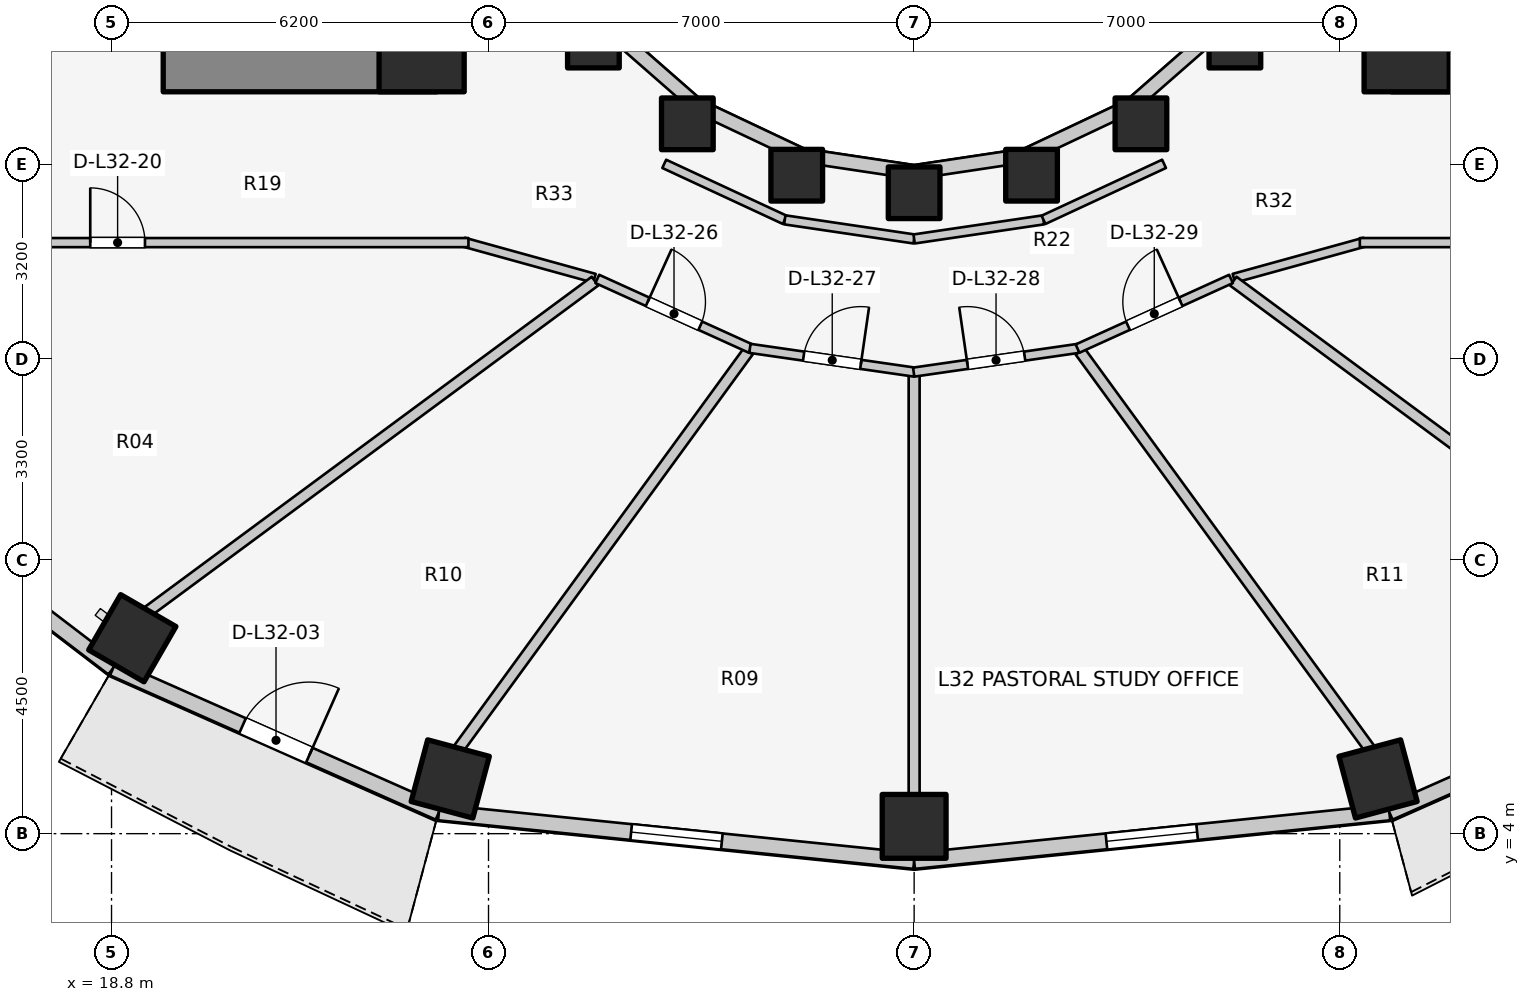
"""IFC4 building model, lengths in metres.
Left out: names, types, materials, properties, quantities, classifications, styles, units other than length and angle.
Written with IfcOpenShell. Run it as: python <this file> out.ifc"""

import sys

from ifc_helpers import new_model, si_unit, direction, frame, frame_2d, origin, origin_2d, place, context, subcontext, project, spatial, rectangle, extrude, element, fill, save


model = new_model("IFC4")
c1 = context("Model", 3, precision=1e-05, world=origin(), true_north=direction((0.0, 1.0)))
c2 = subcontext(c1, "Body", "Model", "MODEL_VIEW")
j1 = project(units=[si_unit("LENGTHUNIT", "METRE"), si_unit("PLANEANGLEUNIT", "RADIAN")], contexts=[c1])
p1 = place(None, origin())
s1 = spatial("IfcSite", under=j1, at=p1, CompositionType="ELEMENT")
p2 = place(p1, origin())
s2 = spatial("IfcBuilding", under=s1, at=p2, CompositionType="ELEMENT")
p3 = place(p2, frame((0.0, 0.0, 107.3)))
s3 = spatial("IfcBuildingStorey", under=s2, at=p3, CompositionType="ELEMENT", Elevation=107.3)
for number, where, z_axis, x_axis in (
    (1, (19.65, 16.55, 0.0), (0.0, 0.0, 1.0), (1.0, 0.0, 0.0)),
    (2, (39.85, 16.55, 0.0), (0.0, 0.0, 1.0), (1.0, 0.0, 0.0)),
):
    element("IfcWall", number, at=place(p3, frame(where, z_axis=z_axis, x_axis=x_axis)), inside=s3, PredefinedType="SHEAR", context=c2, shape_type="SweptSolid", body=[
        extrude(rectangle(XDim=4.5, YDim=0.7, at=frame_2d((2.25, 0.0))), origin(), (0.0, 0.0, 1.0), 3.1),
    ])
for number, where, z_axis, x_axis in (
    (3, (23.9, 16.9, 0.0), (0.0, 0.0, 1.0), (1.0, 0.0, 0.0)),
    (4, (40.1, 16.9, 0.0), (0.0, 0.0, 1.0), (1.0, 0.0, 0.0)),
):
    element("IfcColumn", number, at=place(p3, frame(where, z_axis=z_axis, x_axis=x_axis)), inside=s3, PredefinedType="COLUMN", context=c2, shape_type="SweptSolid", body=[
        extrude(rectangle(XDim=1.4, YDim=1.4, at=origin_2d()), origin(), (0.0, 0.0, 1.0), 3.1),
    ])
for number, where, z_axis, x_axis in (
    (5, (26.725, 17.018, 0.0), (0.0, 0.0, 1.0), (1.0, 0.0, 0.0)),
    (6, (28.27, 15.673, 0.0), (0.0, 0.0, 1.0), (1.0, 0.0, 0.0)),
):
    element("IfcColumn", number, at=place(p3, frame(where, z_axis=z_axis, x_axis=x_axis)), inside=s3, PredefinedType="COLUMN", context=c2, shape_type="SweptSolid", body=[
        extrude(rectangle(XDim=0.85, YDim=0.85, at=origin_2d()), origin(), (0.0, 0.0, 1.0), 3.1),
    ])
p4 = place(p3, frame((19.142, 7.214, 0.0), z_axis=(0.0, 0.0, 1.0), x_axis=(-0.5, -0.866025403784, 0.0)))
e7 = element("IfcColumn", 7, at=p4, inside=s3, PredefinedType="COLUMN", context=c2, shape_type="SweptSolid", body=[
    extrude(rectangle(XDim=1.05, YDim=1.05, at=origin_2d()), origin(), (0.0, 0.0, 1.0), 3.1),
])
p5 = place(p3, frame((30.069, 14.828, 0.0), z_axis=(0.0, 0.0, 1.0), x_axis=(1.0, 0.0, 0.0)))
e8 = element("IfcColumn", 8, at=p5, inside=s3, PredefinedType="COLUMN", context=c2, shape_type="SweptSolid", body=[
    extrude(rectangle(XDim=0.85, YDim=0.85, at=origin_2d()), origin(), (0.0, 0.0, 1.0), 3.1),
])
p6 = place(p3, frame((24.371, 4.9, 0.0), z_axis=(0.0, 0.0, 1.0), x_axis=(-0.258819045103, -0.965925826289, 0.0)))
e9 = element("IfcColumn", 9, at=p6, inside=s3, PredefinedType="COLUMN", context=c2, shape_type="SweptSolid", body=[
    extrude(rectangle(XDim=1.05, YDim=1.05, at=origin_2d()), origin(), (0.0, 0.0, 1.0), 3.1),
])
p7 = place(p3, frame((32.0, 14.54, 0.0), z_axis=(0.0, 0.0, 1.0), x_axis=(1.0, 0.0, 0.0)))
e10 = element("IfcColumn", 10, at=p7, inside=s3, PredefinedType="COLUMN", context=c2, shape_type="SweptSolid", body=[
    extrude(rectangle(XDim=0.85, YDim=0.85, at=origin_2d()), origin(), (0.0, 0.0, 1.0), 3.1),
])
p8 = place(p3, frame((32.0, 4.12, 0.0), z_axis=(0.0, 0.0, 1.0), x_axis=(0.0, -1.0, 0.0)))
e11 = element("IfcColumn", 11, at=p8, inside=s3, PredefinedType="COLUMN", context=c2, shape_type="SweptSolid", body=[
    extrude(rectangle(XDim=1.05, YDim=1.05, at=origin_2d()), origin(), (0.0, 0.0, 1.0), 3.1),
])
p9 = place(p3, frame((33.931, 14.828, 0.0), z_axis=(0.0, 0.0, 1.0), x_axis=(1.0, 0.0, 0.0)))
e12 = element("IfcColumn", 12, at=p9, inside=s3, PredefinedType="COLUMN", context=c2, shape_type="SweptSolid", body=[
    extrude(rectangle(XDim=0.85, YDim=0.85, at=origin_2d()), origin(), (0.0, 0.0, 1.0), 3.1),
])
p10 = place(p3, frame((39.629, 4.9, 0.0), z_axis=(0.0, 0.0, 1.0), x_axis=(0.258819045103, -0.965925826289, 0.0)))
e13 = element("IfcColumn", 13, at=p10, inside=s3, PredefinedType="COLUMN", context=c2, shape_type="SweptSolid", body=[
    extrude(rectangle(XDim=1.05, YDim=1.05, at=origin_2d()), origin(), (0.0, 0.0, 1.0), 3.1),
])
for number, where, z_axis, x_axis in (
    (14, (35.73, 15.673, 0.0), (0.0, 0.0, 1.0), (1.0, 0.0, 0.0)),
    (15, (37.275, 17.018, 0.0), (0.0, 0.0, 1.0), (1.0, 0.0, 0.0)),
):
    element("IfcColumn", number, at=place(p3, frame(where, z_axis=z_axis, x_axis=x_axis)), inside=s3, PredefinedType="COLUMN", context=c2, shape_type="SweptSolid", body=[
        extrude(rectangle(XDim=0.85, YDim=0.85, at=origin_2d()), origin(), (0.0, 0.0, 1.0), 3.1),
    ])
p11 = place(p3, frame((26.965, 17.258, 0.0), z_axis=(0.0, 0.0, 1.0), x_axis=(0.752576694707, -0.658504607869, 0.0)))
e16 = element("IfcWall", 16, at=p11, inside=s3, PredefinedType="STANDARD", context=c2, shape_type="SweptSolid", body=[
    extrude(rectangle(XDim=1.959, YDim=0.23, at=frame_2d((0.98, 0.0))), origin(), (0.0, 0.0, 1.0), 2.16),
])
p12 = place(p3, frame((28.44, 15.968, 0.0), z_axis=(0.0, 0.0, 1.0), x_axis=(0.904179699603, -0.427152280606, 0.0)))
e17 = element("IfcWall", 17, at=p12, inside=s3, PredefinedType="STANDARD", context=c2, shape_type="SweptSolid", body=[
    extrude(rectangle(XDim=1.899, YDim=0.23, at=frame_2d((0.95, 0.0))), origin(), (0.0, 0.0, 1.0), 2.16),
])
for number, where, z_axis, x_axis in (
    (18, (30.157, 15.157, 0.0), (0.0, 0.0, 1.0), (0.989, -0.149, 0.0)),
    (19, (32.0, 14.88, 0.0), (0.0, 0.0, 1.0), (0.989, 0.149, 0.0)),
):
    element("IfcWall", number, at=place(p3, frame(where, z_axis=z_axis, x_axis=x_axis)), inside=s3, PredefinedType="STANDARD", context=c2, shape_type="SweptSolid", body=[
        extrude(rectangle(XDim=1.864, YDim=0.23, at=frame_2d((0.932, 0.0))), origin(), (0.0, 0.0, 1.0), 2.16),
    ])
p13 = place(p3, frame((33.843, 15.157, 0.0), z_axis=(0.0, 0.0, 1.0), x_axis=(0.904179699603, 0.427152280606, 0.0)))
e20 = element("IfcWall", 20, at=p13, inside=s3, PredefinedType="STANDARD", context=c2, shape_type="SweptSolid", body=[
    extrude(rectangle(XDim=1.899, YDim=0.23, at=frame_2d((0.95, 0.0))), origin(), (0.0, 0.0, 1.0), 2.16),
])
p14 = place(p3, frame((35.56, 15.968, 0.0), z_axis=(0.0, 0.0, 1.0), x_axis=(0.752576694707, 0.658504607869, 0.0)))
e21 = element("IfcWall", 21, at=p14, inside=s3, PredefinedType="STANDARD", context=c2, shape_type="SweptSolid", body=[
    extrude(rectangle(XDim=1.959, YDim=0.23, at=frame_2d((0.98, 0.0))), origin(), (0.0, 0.0, 1.0), 2.16),
])
p15 = place(p3, frame((14.734, 9.847, 0.0), z_axis=(0.0, 0.0, 1.0), x_axis=(0.794809810864, -0.606858603427, 0.0)))
e22 = element("IfcWall", 22, at=p15, inside=s3, PredefinedType="STANDARD", context=c2, shape_type="SweptSolid", body=[
    extrude(rectangle(XDim=5.149, YDim=0.26, at=frame_2d((2.575, 0.0))), origin(), (0.0, 0.0, 1.0), 2.85),
])
p16 = place(p3, frame((18.827, 6.722, 0.0), z_axis=(0.0, 0.0, 1.0), x_axis=(0.914336605747, -0.404955023911, 0.0)))
e23 = element("IfcWall", 23, at=p16, inside=s3, PredefinedType="STANDARD", context=c2, shape_type="SweptSolid", body=[
    extrude(rectangle(XDim=5.859, YDim=0.26, at=frame_2d((2.929, 0.0))), origin(), (0.0, 0.0, 1.0), 2.88),
])
p17 = place(p16, frame((2.329, 0.0, 0.0)))
e24 = element("IfcOpeningElement", 24, at=p17, cuts=e23, PredefinedType="OPENING", context=c2, shape_type="SweptSolid", body=[
    extrude(rectangle(XDim=1.2, YDim=2.2, at=frame_2d((0.6, 1.1))), frame((0.0, 0.14, 0.0), z_axis=(0.0, -1.0, 0.0), x_axis=(1.0, 0.0, 0.0)), (0.0, 0.0, 1.0), 0.28),
])
p18 = place(p3, frame((24.184, 4.349, 0.0), z_axis=(0.0, 0.0, 1.0), x_axis=(0.994821390558, -0.101638579726, 0.0)))
e25 = element("IfcWall", 25, at=p18, inside=s3, PredefinedType="STANDARD", context=c2, shape_type="SweptSolid", body=[
    extrude(rectangle(XDim=7.857, YDim=0.26, at=frame_2d((3.929, 0.0))), origin(), (0.0, 0.0, 1.0), 2.85),
])
p19 = place(p18, frame((3.178, 0.0, 0.75)))
e26 = element("IfcOpeningElement", 26, at=p19, cuts=e25, PredefinedType="OPENING", context=c2, shape_type="SweptSolid", body=[
    extrude(rectangle(XDim=1.5, YDim=1.6, at=frame_2d((0.75, 0.8))), frame((0.0, 0.14, 0.0), z_axis=(0.0, -1.0, 0.0), x_axis=(1.0, 0.0, 0.0)), (0.0, 0.0, 1.0), 0.28),
])
p20 = place(p3, frame((32.0, 3.551, 0.0), z_axis=(0.0, 0.0, 1.0), x_axis=(0.994821390558, 0.101638579726, 0.0)))
e27 = element("IfcWall", 27, at=p20, inside=s3, PredefinedType="STANDARD", context=c2, shape_type="SweptSolid", body=[
    extrude(rectangle(XDim=7.857, YDim=0.26, at=frame_2d((3.929, 0.0))), origin(), (0.0, 0.0, 1.0), 2.85),
])
p21 = place(p20, frame((3.178, 0.0, 0.75)))
e28 = element("IfcOpeningElement", 28, at=p21, cuts=e27, PredefinedType="OPENING", context=c2, shape_type="SweptSolid", body=[
    extrude(rectangle(XDim=1.5, YDim=1.6, at=frame_2d((0.75, 0.8))), frame((0.0, 0.14, 0.0), z_axis=(0.0, -1.0, 0.0), x_axis=(1.0, 0.0, 0.0)), (0.0, 0.0, 1.0), 0.28),
])
p22 = place(p3, frame((39.816, 4.349, 0.0), z_axis=(0.0, 0.0, 1.0), x_axis=(0.914336605747, 0.404955023911, 0.0)))
e29 = element("IfcWall", 29, at=p22, inside=s3, PredefinedType="STANDARD", context=c2, shape_type="SweptSolid", body=[
    extrude(rectangle(XDim=5.859, YDim=0.26, at=frame_2d((2.929, 0.0))), origin(), (0.0, 0.0, 1.0), 2.88),
])
p23 = place(p22, frame((2.329, 0.0, 0.0)))
e30 = element("IfcOpeningElement", 30, at=p23, cuts=e29, PredefinedType="OPENING", context=c2, shape_type="SweptSolid", body=[
    extrude(rectangle(XDim=1.2, YDim=2.2, at=frame_2d((0.6, 1.1))), frame((0.0, 0.14, 0.0), z_axis=(0.0, -1.0, 0.0), x_axis=(1.0, 0.0, 0.0)), (0.0, 0.0, 1.0), 0.28),
])
p24 = place(p3, frame((27.89, 15.015, 0.0), z_axis=(0.0, 0.0, 1.0), x_axis=(0.906943449489, -0.421252393975, 0.0)))
e31 = element("IfcWall", 31, at=p24, inside=s3, PredefinedType="PARTITIONING", context=c2, shape_type="SweptSolid", body=[
    extrude(rectangle(XDim=2.186, YDim=0.15, at=frame_2d((1.093, 0.0))), origin(), (0.0, 0.0, 1.0), 2.272),
])
for number, where, z_axis, x_axis in (
    (32, (29.873, 14.094, 0.0), (0.0, 0.0, 1.0), (0.989, -0.146, 0.0)),
    (33, (32.0, 13.78, 0.0), (0.0, 0.0, 1.0), (0.989, 0.146, 0.0)),
):
    element("IfcWall", number, at=place(p3, frame(where, z_axis=z_axis, x_axis=x_axis)), inside=s3, PredefinedType="PARTITIONING", context=c2, shape_type="SweptSolid", body=[
        extrude(rectangle(XDim=2.151, YDim=0.15, at=frame_2d((1.075, 0.0))), origin(), (0.0, 0.0, 1.0), 2.272),
    ])
p25 = place(p3, frame((34.127, 14.094, 0.0), z_axis=(0.0, 0.0, 1.0), x_axis=(0.906943449489, 0.421252393975, 0.0)))
e34 = element("IfcWall", 34, at=p25, inside=s3, PredefinedType="PARTITIONING", context=c2, shape_type="SweptSolid", body=[
    extrude(rectangle(XDim=2.186, YDim=0.15, at=frame_2d((1.093, 0.0))), origin(), (0.0, 0.0, 1.0), 2.272),
])
p26 = place(p3, frame((26.742, 13.133, 0.0), z_axis=(0.0, 0.0, 1.0), x_axis=(-0.963833843713, 0.266503886865, 0.0)))
e35 = element("IfcWall", 35, at=p26, inside=s3, PredefinedType="PARTITIONING", context=c2, shape_type="SweptSolid", body=[
    extrude(rectangle(XDim=2.232, YDim=0.15, at=frame_2d((1.116, 0.0))), origin(), (0.0, 0.0, 1.0), 2.272),
])
p27 = place(p3, frame((17.15, 13.72, 0.0), z_axis=(0.0, 0.0, 1.0), x_axis=(1.0, 0.0, 0.0)))
e36 = element("IfcWall", 36, at=p27, inside=s3, PredefinedType="PARTITIONING", context=c2, shape_type="SweptSolid", body=[
    extrude(rectangle(XDim=7.52, YDim=0.15, at=frame_2d((3.76, 0.0))), origin(), (0.0, 0.0, 1.0), 2.272),
])
p28 = place(p27, frame((1.3, 0.0, 0.0)))
e37 = element("IfcOpeningElement", 37, at=p28, cuts=e36, PredefinedType="OPENING", context=c2, shape_type="SweptSolid", body=[
    extrude(rectangle(XDim=0.9, YDim=2.1, at=frame_2d((0.45, 1.05))), frame((0.0, 0.085, 0.0), z_axis=(0.0, -1.0, 0.0), x_axis=(1.0, 0.0, 0.0)), (0.0, 0.0, 1.0), 0.17),
])
p29 = place(p3, frame((37.258, 13.133, 0.0), z_axis=(0.0, 0.0, 1.0), x_axis=(0.963833843713, 0.266503886865, 0.0)))
e38 = element("IfcWall", 38, at=p29, inside=s3, PredefinedType="PARTITIONING", context=c2, shape_type="SweptSolid", body=[
    extrude(rectangle(XDim=2.232, YDim=0.15, at=frame_2d((1.116, 0.0))), origin(), (0.0, 0.0, 1.0), 2.272),
])
p30 = place(p3, frame((39.33, 13.72, 0.0), z_axis=(0.0, 0.0, 1.0), x_axis=(1.0, 0.0, 0.0)))
e39 = element("IfcWall", 39, at=p30, inside=s3, PredefinedType="PARTITIONING", context=c2, shape_type="SweptSolid", body=[
    extrude(rectangle(XDim=7.52, YDim=0.15, at=frame_2d((3.76, 0.0))), origin(), (0.0, 0.0, 1.0), 2.272),
])
p31 = place(p30, frame((5.22, 0.0, 0.0)))
e40 = element("IfcOpeningElement", 40, at=p31, cuts=e39, PredefinedType="OPENING", context=c2, shape_type="SweptSolid", body=[
    extrude(rectangle(XDim=0.9, YDim=2.1, at=frame_2d((0.45, 1.05))), frame((0.0, 0.085, 0.0), z_axis=(0.0, -1.0, 0.0), x_axis=(1.0, 0.0, 0.0)), (0.0, 0.0, 1.0), 0.17),
])
p32 = place(p3, frame((26.751, 13.086, 0.0), z_axis=(0.0, 0.0, 1.0), x_axis=(-0.80430981394, -0.594210167533, 0.0)))
e41 = element("IfcWall", 41, at=p32, inside=s3, PredefinedType="PARTITIONING", context=c2, shape_type="SweptSolid", body=[
    extrude(rectangle(XDim=9.146, YDim=0.18, at=frame_2d((4.573, 0.0))), origin(), (0.0, 0.0, 1.0), 2.272),
])
p33 = place(p3, frame((29.273, 11.934, 0.0), z_axis=(0.0, 0.0, 1.0), x_axis=(-0.589042211476, -0.808102266486, 0.0)))
e42 = element("IfcWall", 42, at=p33, inside=s3, PredefinedType="PARTITIONING", context=c2, shape_type="SweptSolid", body=[
    extrude(rectangle(XDim=8.101, YDim=0.18, at=frame_2d((4.051, 0.0))), origin(), (0.0, 0.0, 1.0), 2.272),
])
p34 = place(p3, frame((32.0, 11.535, 0.0), z_axis=(0.0, 0.0, 1.0), x_axis=(0.0, -1.0, 0.0)))
e43 = element("IfcWall", 43, at=p34, inside=s3, PredefinedType="PARTITIONING", context=c2, shape_type="SweptSolid", body=[
    extrude(rectangle(XDim=6.91, YDim=0.18, at=frame_2d((3.455, 0.0))), origin(), (0.0, 0.0, 1.0), 2.272),
])
p35 = place(p3, frame((34.727, 11.934, 0.0), z_axis=(0.0, 0.0, 1.0), x_axis=(0.589042211476, -0.808102266486, 0.0)))
e44 = element("IfcWall", 44, at=p35, inside=s3, PredefinedType="PARTITIONING", context=c2, shape_type="SweptSolid", body=[
    extrude(rectangle(XDim=8.101, YDim=0.18, at=frame_2d((4.051, 0.0))), origin(), (0.0, 0.0, 1.0), 2.272),
])
p36 = place(p3, frame((37.249, 13.086, 0.0), z_axis=(0.0, 0.0, 1.0), x_axis=(0.80430981394, -0.594210167533, 0.0)))
e45 = element("IfcWall", 45, at=p36, inside=s3, PredefinedType="PARTITIONING", context=c2, shape_type="SweptSolid", body=[
    extrude(rectangle(XDim=9.146, YDim=0.18, at=frame_2d((4.573, 0.0))), origin(), (0.0, 0.0, 1.0), 2.272),
])
p37 = place(p3, frame((26.789, 13.123, 0.0), z_axis=(0.0, 0.0, 1.0), x_axis=(0.910568469686, -0.41335827319, 0.0)))
e46 = element("IfcWall", 46, at=p37, inside=s3, PredefinedType="PARTITIONING", context=c2, shape_type="SweptSolid", body=[
    extrude(rectangle(XDim=2.772, YDim=0.15, at=frame_2d((1.386, 0.0))), origin(), (0.0, 0.0, 1.0), 2.272),
])
p38 = place(p37, frame((0.911, 0.0, 0.0)))
e47 = element("IfcOpeningElement", 47, at=p38, cuts=e46, PredefinedType="OPENING", context=c2, shape_type="SweptSolid", body=[
    extrude(rectangle(XDim=0.95, YDim=2.1, at=frame_2d((0.475, 1.05))), frame((0.0, 0.085, 0.0), z_axis=(0.0, -1.0, 0.0), x_axis=(1.0, 0.0, 0.0)), (0.0, 0.0, 1.0), 0.17),
])
p39 = place(p3, frame((29.299, 11.981, 0.0), z_axis=(0.0, 0.0, 1.0), x_axis=(0.989748682384, -0.142819976611, 0.0)))
e48 = element("IfcWall", 48, at=p39, inside=s3, PredefinedType="PARTITIONING", context=c2, shape_type="SweptSolid", body=[
    extrude(rectangle(XDim=2.737, YDim=0.15, at=frame_2d((1.368, 0.0))), origin(), (0.0, 0.0, 1.0), 2.272),
])
p40 = place(p39, frame((0.893, 0.0, 0.0)))
e49 = element("IfcOpeningElement", 49, at=p40, cuts=e48, PredefinedType="OPENING", context=c2, shape_type="SweptSolid", body=[
    extrude(rectangle(XDim=0.95, YDim=2.1, at=frame_2d((0.475, 1.05))), frame((0.0, 0.085, 0.0), z_axis=(0.0, -1.0, 0.0), x_axis=(1.0, 0.0, 0.0)), (0.0, 0.0, 1.0), 0.17),
])
p41 = place(p3, frame((31.993, 11.59, 0.0), z_axis=(0.0, 0.0, 1.0), x_axis=(0.989748682384, 0.142819976611, 0.0)))
e50 = element("IfcWall", 50, at=p41, inside=s3, PredefinedType="PARTITIONING", context=c2, shape_type="SweptSolid", body=[
    extrude(rectangle(XDim=2.737, YDim=0.15, at=frame_2d((1.368, 0.0))), origin(), (0.0, 0.0, 1.0), 2.272),
])
p42 = place(p41, frame((0.893, 0.0, 0.0)))
e51 = element("IfcOpeningElement", 51, at=p42, cuts=e50, PredefinedType="OPENING", context=c2, shape_type="SweptSolid", body=[
    extrude(rectangle(XDim=0.95, YDim=2.1, at=frame_2d((0.475, 1.05))), frame((0.0, 0.085, 0.0), z_axis=(0.0, -1.0, 0.0), x_axis=(1.0, 0.0, 0.0)), (0.0, 0.0, 1.0), 0.17),
])
p43 = place(p3, frame((34.687, 11.977, 0.0), z_axis=(0.0, 0.0, 1.0), x_axis=(0.910568469686, 0.41335827319, 0.0)))
e52 = element("IfcWall", 52, at=p43, inside=s3, PredefinedType="PARTITIONING", context=c2, shape_type="SweptSolid", body=[
    extrude(rectangle(XDim=2.772, YDim=0.15, at=frame_2d((1.386, 0.0))), origin(), (0.0, 0.0, 1.0), 2.272),
])
p44 = place(p43, frame((0.911, 0.0, 0.0)))
e53 = element("IfcOpeningElement", 53, at=p44, cuts=e52, PredefinedType="OPENING", context=c2, shape_type="SweptSolid", body=[
    extrude(rectangle(XDim=0.95, YDim=2.1, at=frame_2d((0.475, 1.05))), frame((0.0, 0.085, 0.0), z_axis=(0.0, -1.0, 0.0), x_axis=(1.0, 0.0, 0.0)), (0.0, 0.0, 1.0), 0.17),
])
p45 = place(p17, origin())
e54 = element("IfcDoor", 54, at=p45, inside=s3, OperationType="SINGLE_SWING_RIGHT", PredefinedType="DOOR", context=c2, shape_type="SweptSolid", body=[
    extrude(rectangle(XDim=1.2, YDim=2.2, at=frame_2d((0.6, 1.1))), frame((0.0, 0.025, 0.0), z_axis=(0.0, -1.0, 0.0), x_axis=(1.0, 0.0, 0.0)), (0.0, 0.0, 1.0), 0.05),
])
fill(e24, e54)
p46 = place(p19, origin())
e55 = element("IfcWindow", 55, at=p46, inside=s3, PartitioningType="SINGLE_PANEL", PredefinedType="WINDOW", context=c2, shape_type="SweptSolid", body=[
    extrude(rectangle(XDim=1.5, YDim=1.6, at=frame_2d((0.75, 0.8))), frame((0.0, 0.03, 0.0), z_axis=(0.0, -1.0, 0.0), x_axis=(1.0, 0.0, 0.0)), (0.0, 0.0, 1.0), 0.06),
])
fill(e26, e55)
p47 = place(p21, origin())
e56 = element("IfcWindow", 56, at=p47, inside=s3, PartitioningType="SINGLE_PANEL", PredefinedType="WINDOW", context=c2, shape_type="SweptSolid", body=[
    extrude(rectangle(XDim=1.5, YDim=1.6, at=frame_2d((0.75, 0.8))), frame((0.0, 0.03, 0.0), z_axis=(0.0, -1.0, 0.0), x_axis=(1.0, 0.0, 0.0)), (0.0, 0.0, 1.0), 0.06),
])
fill(e28, e56)
p48 = place(p28, origin())
e57 = element("IfcDoor", 57, at=p48, inside=s3, OperationType="SINGLE_SWING_LEFT", PredefinedType="DOOR", context=c2, shape_type="SweptSolid", body=[
    extrude(rectangle(XDim=0.9, YDim=2.1, at=frame_2d((0.45, 1.05))), frame((0.0, 0.025, 0.0), z_axis=(0.0, -1.0, 0.0), x_axis=(1.0, 0.0, 0.0)), (0.0, 0.0, 1.0), 0.05),
])
fill(e37, e57)
p49 = place(p38, origin())
e58 = element("IfcDoor", 58, at=p49, inside=s3, OperationType="SINGLE_SWING_LEFT", PredefinedType="DOOR", context=c2, shape_type="SweptSolid", body=[
    extrude(rectangle(XDim=0.95, YDim=2.1, at=frame_2d((0.475, 1.05))), frame((0.0, 0.025, 0.0), z_axis=(0.0, -1.0, 0.0), x_axis=(1.0, 0.0, 0.0)), (0.0, 0.0, 1.0), 0.05),
])
fill(e47, e58)
p50 = place(p40, origin())
e59 = element("IfcDoor", 59, at=p50, inside=s3, OperationType="SINGLE_SWING_RIGHT", PredefinedType="DOOR", context=c2, shape_type="SweptSolid", body=[
    extrude(rectangle(XDim=0.95, YDim=2.1, at=frame_2d((0.475, 1.05))), frame((0.0, 0.025, 0.0), z_axis=(0.0, -1.0, 0.0), x_axis=(1.0, 0.0, 0.0)), (0.0, 0.0, 1.0), 0.05),
])
fill(e49, e59)
p51 = place(p42, origin())
e60 = element("IfcDoor", 60, at=p51, inside=s3, OperationType="SINGLE_SWING_LEFT", PredefinedType="DOOR", context=c2, shape_type="SweptSolid", body=[
    extrude(rectangle(XDim=0.95, YDim=2.1, at=frame_2d((0.475, 1.05))), frame((0.0, 0.025, 0.0), z_axis=(0.0, -1.0, 0.0), x_axis=(1.0, 0.0, 0.0)), (0.0, 0.0, 1.0), 0.05),
])
fill(e51, e60)
p52 = place(p44, origin())
e61 = element("IfcDoor", 61, at=p52, inside=s3, OperationType="SINGLE_SWING_RIGHT", PredefinedType="DOOR", context=c2, shape_type="SweptSolid", body=[
    extrude(rectangle(XDim=0.95, YDim=2.1, at=frame_2d((0.475, 1.05))), frame((0.0, 0.025, 0.0), z_axis=(0.0, -1.0, 0.0), x_axis=(1.0, 0.0, 0.0)), (0.0, 0.0, 1.0), 0.05),
])
fill(e53, e61)
save(model, sys.argv[1])
